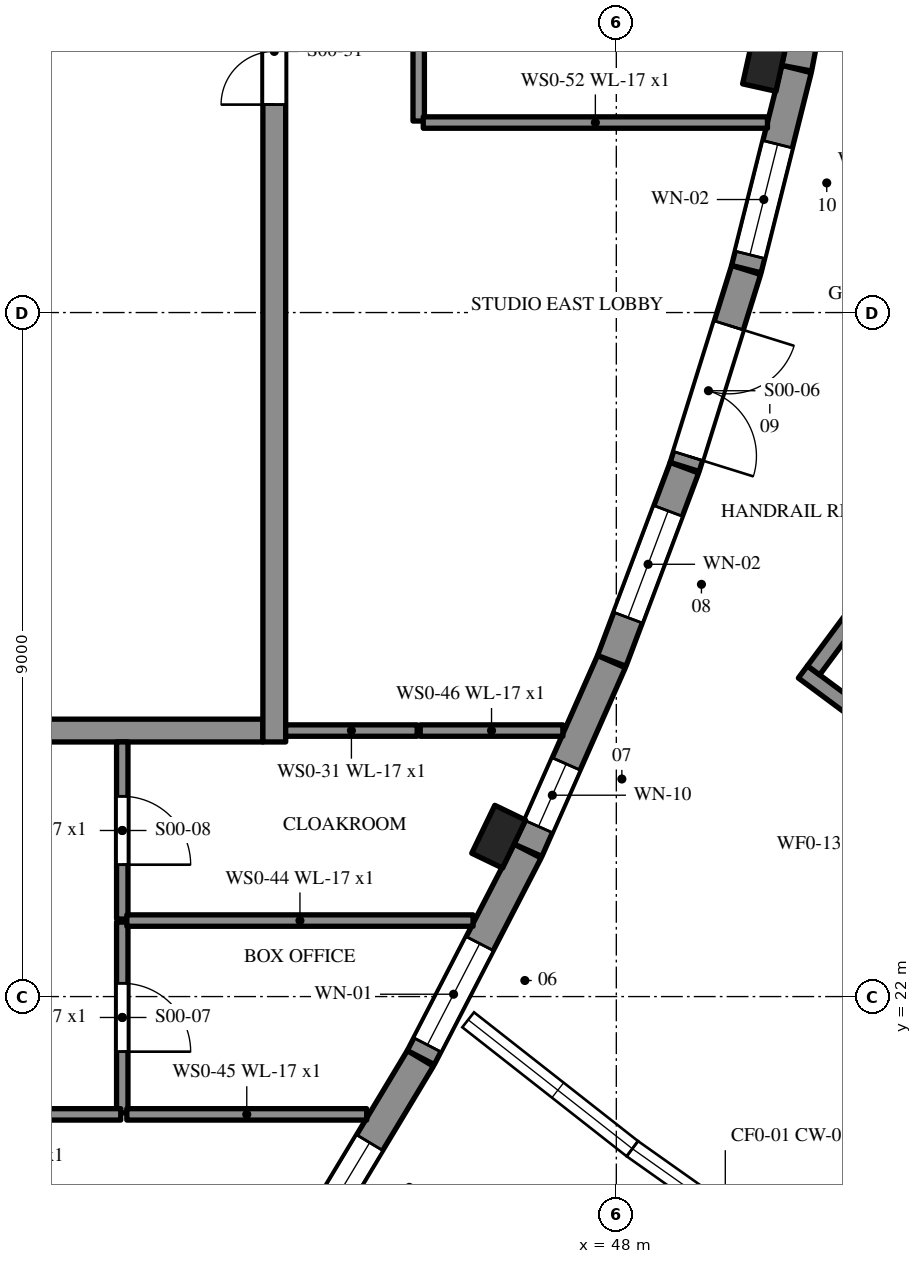
"""IFC4 building model, lengths in metres.
Left out: names, types, materials, properties, quantities, classifications, styles, units other than length and angle.
Written with IfcOpenShell. Run it as: python <this file> out.ifc"""

import sys

from ifc_helpers import new_model, si_unit, direction, frame, frame_2d, origin, origin_2d, place, context, subcontext, project, spatial, rectangle, extrude, element, fill, save


model = new_model("IFC4")
c1 = context("Model", 3, precision=1e-05, world=origin(), true_north=direction((0.0, 1.0)))
c2 = subcontext(c1, "Body", "Model", "MODEL_VIEW")
j1 = project(units=[si_unit("LENGTHUNIT", "METRE"), si_unit("PLANEANGLEUNIT", "RADIAN")], contexts=[c1])
p1 = place(None, origin())
s1 = spatial("IfcSite", under=j1, at=p1, CompositionType="ELEMENT")
p2 = place(p1, origin())
s2 = spatial("IfcBuilding", under=s1, at=p2, CompositionType="ELEMENT")
p3 = place(p2, origin())
s3 = spatial("IfcBuildingStorey", under=s2, at=p3, CompositionType="ELEMENT", Elevation=0.0)
p4 = place(p3, frame((43.846, 18.566, 0.0), z_axis=(0.0, 0.0, 1.0), x_axis=(0.515387841983, 0.856957042293, 0.0)))
e1 = element("IfcWall", 1, at=p4, inside=s3, PredefinedType="SOLIDWALL", context=c2, shape_type="SweptSolid", body=[
    extrude(rectangle(XDim=3.058, YDim=0.4, at=frame_2d((1.529, 0.0))), origin(), (0.0, 0.0, 1.0), 5.1),
])
p5 = place(p4, frame((0.264, 0.0, 2.4)))
e2 = element("IfcOpeningElement", 2, at=p5, cuts=e1, PredefinedType="OPENING", context=c2, shape_type="SweptSolid", body=[
    extrude(rectangle(XDim=1.5, YDim=0.9, at=frame_2d((0.75, 0.45))), frame((0.0, 0.21, 0.0), z_axis=(0.0, -1.0, 0.0), x_axis=(1.0, 0.0, 0.0)), (0.0, 0.0, 1.0), 0.42),
])
p6 = place(p3, frame((45.428, 21.198, 0.0), z_axis=(0.0, 0.0, 1.0), x_axis=(0.45930565039, 0.888278289457, 0.0)))
e3 = element("IfcWall", 3, at=p6, inside=s3, PredefinedType="SOLIDWALL", context=c2, shape_type="SweptSolid", body=[
    extrude(rectangle(XDim=3.059, YDim=0.4, at=frame_2d((1.529, 0.0))), origin(), (0.0, 0.0, 1.0), 5.1),
])
p7 = place(p6, frame((0.188, 0.0, 0.9)))
e4 = element("IfcOpeningElement", 4, at=p7, cuts=e3, PredefinedType="OPENING", context=c2, shape_type="SweptSolid", body=[
    extrude(rectangle(XDim=1.5, YDim=2.1, at=frame_2d((0.75, 1.05))), frame((0.0, 0.21, 0.0), z_axis=(0.0, -1.0, 0.0), x_axis=(1.0, 0.0, 0.0)), (0.0, 0.0, 1.0), 0.42),
])
p8 = place(p3, frame((46.838, 23.925, 0.0), z_axis=(0.0, 0.0, 1.0), x_axis=(0.404652153757, 0.914470685402, 0.0)))
e5 = element("IfcWall", 5, at=p8, inside=s3, PredefinedType="SOLIDWALL", context=c2, shape_type="SweptSolid", body=[
    extrude(rectangle(XDim=2.714, YDim=0.4, at=frame_2d((1.357, 0.0))), origin(), (0.0, 0.0, 1.0), 5.1),
])
p9 = place(p8, frame((0.342, 0.0, 0.9)))
e6 = element("IfcOpeningElement", 6, at=p9, cuts=e5, PredefinedType="OPENING", context=c2, shape_type="SweptSolid", body=[
    extrude(rectangle(XDim=0.9, YDim=2.1, at=frame_2d((0.45, 1.05))), frame((0.0, 0.21, 0.0), z_axis=(0.0, -1.0, 0.0), x_axis=(1.0, 0.0, 0.0)), (0.0, 0.0, 1.0), 0.42),
])
p10 = place(p3, frame((47.94, 26.417, 0.0), z_axis=(0.0, 0.0, 1.0), x_axis=(0.351862601417, 0.936051659752, 0.0)))
e7 = element("IfcWall", 7, at=p10, inside=s3, PredefinedType="SOLIDWALL", context=c2, shape_type="SweptSolid", body=[
    extrude(rectangle(XDim=2.714, YDim=0.4, at=frame_2d((1.357, 0.0))), origin(), (0.0, 0.0, 1.0), 5.1),
])
p11 = place(p10, frame((0.607, 0.0, 0.3)))
e8 = element("IfcOpeningElement", 8, at=p11, cuts=e7, PredefinedType="OPENING", context=c2, shape_type="SweptSolid", body=[
    extrude(rectangle(XDim=1.5, YDim=2.7, at=frame_2d((0.75, 1.35))), frame((0.0, 0.21, 0.0), z_axis=(0.0, -1.0, 0.0), x_axis=(1.0, 0.0, 0.0)), (0.0, 0.0, 1.0), 0.42),
])
p12 = place(p3, frame((48.899, 28.969, 0.0), z_axis=(0.0, 0.0, 1.0), x_axis=(0.29795748067, 0.954579142718, 0.0)))
e9 = element("IfcWall", 9, at=p12, inside=s3, PredefinedType="SOLIDWALL", context=c2, shape_type="SweptSolid", body=[
    extrude(rectangle(XDim=2.715, YDim=0.4, at=frame_2d((1.357, 0.0))), origin(), (0.0, 0.0, 1.0), 5.1),
])
p13 = place(p12, frame((0.15, 0.0, 0.0)))
e10 = element("IfcOpeningElement", 10, at=p13, cuts=e9, PredefinedType="OPENING", context=c2, shape_type="SweptSolid", body=[
    extrude(rectangle(XDim=1.8, YDim=2.1, at=frame_2d((0.9, 1.05))), frame((0.0, 0.21, 0.0), z_axis=(0.0, -1.0, 0.0), x_axis=(1.0, 0.0, 0.0)), (0.0, 0.0, 1.0), 0.42),
])
p14 = place(p3, frame((49.711, 31.571, 0.0), z_axis=(0.0, 0.0, 1.0), x_axis=(0.2430011368, 0.970026003525, 0.0)))
e11 = element("IfcWall", 11, at=p14, inside=s3, PredefinedType="SOLIDWALL", context=c2, shape_type="SweptSolid", body=[
    extrude(rectangle(XDim=2.715, YDim=0.4, at=frame_2d((1.357, 0.0))), origin(), (0.0, 0.0, 1.0), 5.1),
])
p15 = place(p14, frame((0.194, 0.0, 0.3)))
e12 = element("IfcOpeningElement", 12, at=p15, cuts=e11, PredefinedType="OPENING", context=c2, shape_type="SweptSolid", body=[
    extrude(rectangle(XDim=1.5, YDim=2.7, at=frame_2d((0.75, 1.35))), frame((0.0, 0.21, 0.0), z_axis=(0.0, -1.0, 0.0), x_axis=(1.0, 0.0, 0.0)), (0.0, 0.0, 1.0), 0.42),
])
p16 = place(p3, frame((50.373, 34.215, 0.0), z_axis=(0.0, 0.0, 1.0), x_axis=(0.188763210152, 0.982022632373, 0.0)))
e13 = element("IfcWall", 13, at=p16, inside=s3, PredefinedType="SOLIDWALL", context=c2, shape_type="SweptSolid", body=[
    extrude(rectangle(XDim=2.582, YDim=0.4, at=frame_2d((1.291, 0.0))), origin(), (0.0, 0.0, 1.0), 5.1),
])
p17 = place(p16, frame((0.841, 0.0, 2.0)))
e14 = element("IfcOpeningElement", 14, at=p17, cuts=e13, PredefinedType="OPENING", context=c2, shape_type="SweptSolid", body=[
    extrude(rectangle(XDim=0.9, YDim=0.6, at=frame_2d((0.45, 0.3))), frame((0.0, 0.21, 0.0), z_axis=(0.0, -1.0, 0.0), x_axis=(1.0, 0.0, 0.0)), (0.0, 0.0, 1.0), 0.42),
])
for number, where, z_axis, x_axis in (
    (15, (46.452, 24.104, 0.0), (0.0, 0.0, 1.0), (0.434, 0.901, 0.0)),
    (16, (49.957, 34.302, 0.0), (0.0, 0.0, 1.0), (0.217, 0.976, 0.0)),
):
    element("IfcColumn", number, at=place(p3, frame(where, z_axis=z_axis, x_axis=x_axis)), inside=s3, PredefinedType="PILASTER", context=c2, shape_type="SweptSolid", body=[
        extrude(rectangle(XDim=0.7, YDim=0.45, at=origin_2d()), origin(), (0.0, 0.0, 1.0), 5.1),
    ])
p18 = place(p3, frame((43.35, 25.5, 0.0), z_axis=(0.0, 0.0, 1.0), x_axis=(-1.0, 0.0, 0.0)))
e17 = element("IfcWall", 17, at=p18, inside=s3, PredefinedType="SHEAR", context=c2, shape_type="SweptSolid", body=[
    extrude(rectangle(XDim=14.7, YDim=0.3, at=frame_2d((7.35, 0.0))), origin(), (0.0, 0.0, 1.0), 5.1),
])
p19 = place(p18, frame((6.45, 0.0, 0.0)))
e18 = element("IfcOpeningElement", 18, at=p19, cuts=e17, PredefinedType="OPENING", context=c2, shape_type="SweptSolid", body=[
    extrude(rectangle(XDim=1.8, YDim=2.1, at=frame_2d((0.9, 1.05))), frame((0.0, 0.16, 0.0), z_axis=(0.0, -1.0, 0.0), x_axis=(1.0, 0.0, 0.0)), (0.0, 0.0, 1.0), 0.32),
])
p20 = place(p3, frame((43.5, 25.35, 0.0), z_axis=(0.0, 0.0, 1.0), x_axis=(0.0, 1.0, 0.0)))
e19 = element("IfcWall", 19, at=p20, inside=s3, PredefinedType="SHEAR", context=c2, shape_type="SweptSolid", body=[
    extrude(rectangle(XDim=41.3, YDim=0.3, at=frame_2d((20.65, 0.0))), origin(), (0.0, 0.0, 1.0), 5.1),
])
p21 = place(p20, frame((8.386, 0.0, 0.0)))
e20 = element("IfcOpeningElement", 20, at=p21, cuts=e19, PredefinedType="OPENING", context=c2, shape_type="SweptSolid", body=[
    extrude(rectangle(XDim=1.4, YDim=2.1, at=frame_2d((0.7, 1.05))), frame((0.0, 0.16, 0.0), z_axis=(0.0, -1.0, 0.0), x_axis=(1.0, 0.0, 0.0)), (0.0, 0.0, 1.0), 0.32),
])
p22 = place(p20, frame((31.514, 0.0, 0.0)))
e21 = element("IfcOpeningElement", 21, at=p22, cuts=e19, PredefinedType="OPENING", context=c2, shape_type="SweptSolid", body=[
    extrude(rectangle(XDim=1.4, YDim=2.1, at=frame_2d((0.7, 1.05))), frame((0.0, 0.16, 0.0), z_axis=(0.0, -1.0, 0.0), x_axis=(1.0, 0.0, 0.0)), (0.0, 0.0, 1.0), 0.32),
])
p23 = place(p3, frame((52.79, 34.037, 0.0), z_axis=(0.0, 0.0, 1.0), x_axis=(-0.714838276245, 0.699289810318, 0.0)))
e22 = element("IfcWall", 22, at=p23, inside=s3, PredefinedType="SHEAR", context=c2, shape_type="SweptSolid", body=[
    extrude(rectangle(XDim=2.497, YDim=0.25, at=frame_2d((1.248, 0.0))), origin(), (0.0, 0.0, 1.0), 5.4),
])
p24 = place(p23, frame((0.748, 0.0, 0.0)))
e23 = element("IfcOpeningElement", 23, at=p24, cuts=e22, PredefinedType="OPENING", context=c2, shape_type="SweptSolid", body=[
    extrude(rectangle(XDim=1.0, YDim=2.1, at=frame_2d((0.5, 1.05))), frame((0.0, 0.135, 0.0), z_axis=(0.0, -1.0, 0.0), x_axis=(1.0, 0.0, 0.0)), (0.0, 0.0, 1.0), 0.27),
])
p25 = place(p3, frame((45.38, 25.5, 0.0), z_axis=(0.0, 0.0, 1.0), x_axis=(-1.0, 0.0, 0.0)))
e24 = element("IfcWall", 24, at=p25, inside=s3, PredefinedType="PARTITIONING", context=c2, shape_type="SweptSolid", body=[
    extrude(rectangle(XDim=1.73, YDim=0.15, at=frame_2d((0.865, 0.0))), origin(), (0.0, 0.0, 1.0), 5.1),
])
p26 = place(p3, frame((45.4, 38.98, 0.0), z_axis=(0.0, 0.0, 1.0), x_axis=(0.0, -1.0, 0.0)))
e25 = element("IfcWall", 25, at=p26, inside=s3, PredefinedType="PARTITIONING", context=c2, shape_type="SweptSolid", body=[
    extrude(rectangle(XDim=5.46, YDim=0.15, at=frame_2d((2.73, 0.0))), origin(), (0.0, 0.0, 1.0), 5.1),
])
p27 = place(p26, frame((2.28, 0.0, 0.0)))
e26 = element("IfcOpeningElement", 26, at=p27, cuts=e25, PredefinedType="OPENING", context=c2, shape_type="SweptSolid", body=[
    extrude(rectangle(XDim=0.9, YDim=2.1, at=frame_2d((0.45, 1.05))), frame((0.0, 0.085, 0.0), z_axis=(0.0, -1.0, 0.0), x_axis=(1.0, 0.0, 0.0)), (0.0, 0.0, 1.0), 0.17),
])
p28 = place(p3, frame((41.5, 22.98, 0.0), z_axis=(0.0, 0.0, 1.0), x_axis=(0.0, -1.0, 0.0)))
e27 = element("IfcWall", 27, at=p28, inside=s3, PredefinedType="PARTITIONING", context=c2, shape_type="SweptSolid", body=[
    extrude(rectangle(XDim=2.51, YDim=0.15, at=frame_2d((1.255, 0.0))), origin(), (0.0, 0.0, 1.0), 5.1),
])
p29 = place(p28, frame((0.805, 0.0, 0.0)))
e28 = element("IfcOpeningElement", 28, at=p29, cuts=e27, PredefinedType="OPENING", context=c2, shape_type="SweptSolid", body=[
    extrude(rectangle(XDim=0.9, YDim=2.1, at=frame_2d((0.45, 1.05))), frame((0.0, 0.085, 0.0), z_axis=(0.0, -1.0, 0.0), x_axis=(1.0, 0.0, 0.0)), (0.0, 0.0, 1.0), 0.17),
])
p30 = place(p3, frame((41.5, 25.351, 0.0), z_axis=(0.0, 0.0, 1.0), x_axis=(0.0, -1.0, 0.0)))
e29 = element("IfcWall", 29, at=p30, inside=s3, PredefinedType="PARTITIONING", context=c2, shape_type="SweptSolid", body=[
    extrude(rectangle(XDim=2.331, YDim=0.15, at=frame_2d((1.165, 0.0))), origin(), (0.0, 0.0, 1.0), 5.1),
])
p31 = place(p30, frame((0.715, 0.0, 0.0)))
e30 = element("IfcOpeningElement", 30, at=p31, cuts=e29, PredefinedType="OPENING", context=c2, shape_type="SweptSolid", body=[
    extrude(rectangle(XDim=0.9, YDim=2.1, at=frame_2d((0.45, 1.05))), frame((0.0, 0.085, 0.0), z_axis=(0.0, -1.0, 0.0), x_axis=(1.0, 0.0, 0.0)), (0.0, 0.0, 1.0), 0.17),
])
p32 = place(p3, frame((41.48, 20.45, 0.0), z_axis=(0.0, 0.0, 1.0), x_axis=(-1.0, 0.0, 0.0)))
e31 = element("IfcWall", 31, at=p32, inside=s3, PredefinedType="PARTITIONING", context=c2, shape_type="SweptSolid", body=[
    extrude(rectangle(XDim=3.46, YDim=0.15, at=frame_2d((1.73, 0.0))), origin(), (0.0, 0.0, 1.0), 5.1),
])
p33 = place(p32, frame((1.28, 0.0, 0.0)))
e32 = element("IfcOpeningElement", 32, at=p33, cuts=e31, PredefinedType="OPENING", context=c2, shape_type="SweptSolid", body=[
    extrude(rectangle(XDim=0.9, YDim=2.1, at=frame_2d((0.45, 1.05))), frame((0.0, 0.085, 0.0), z_axis=(0.0, -1.0, 0.0), x_axis=(1.0, 0.0, 0.0)), (0.0, 0.0, 1.0), 0.17),
])
p34 = place(p3, frame((41.56, 23.0, 0.0), z_axis=(0.0, 0.0, 1.0), x_axis=(1.0, 0.0, 0.0)))
e33 = element("IfcWall", 33, at=p34, inside=s3, PredefinedType="PARTITIONING", context=c2, shape_type="SweptSolid", body=[
    extrude(rectangle(XDim=4.555, YDim=0.15, at=frame_2d((2.278, 0.0))), origin(), (0.0, 0.0, 1.0), 5.1),
])
p35 = place(p3, frame((44.716, 20.45, 0.0), z_axis=(0.0, 0.0, 1.0), x_axis=(-1.0, 0.0, 0.0)))
e34 = element("IfcWall", 34, at=p35, inside=s3, PredefinedType="PARTITIONING", context=c2, shape_type="SweptSolid", body=[
    extrude(rectangle(XDim=3.156, YDim=0.15, at=frame_2d((1.578, 0.0))), origin(), (0.0, 0.0, 1.0), 5.1),
])
p36 = place(p3, frame((45.42, 25.5, 0.0), z_axis=(0.0, 0.0, 1.0), x_axis=(1.0, 0.0, 0.0)))
e35 = element("IfcWall", 35, at=p36, inside=s3, PredefinedType="PARTITIONING", context=c2, shape_type="SweptSolid", body=[
    extrude(rectangle(XDim=1.877, YDim=0.15, at=frame_2d((0.938, 0.0))), origin(), (0.0, 0.0, 1.0), 5.1),
])
p37 = place(p3, frame((45.46, 33.5, 0.0), z_axis=(0.0, 0.0, 1.0), x_axis=(1.0, 0.0, 0.0)))
e36 = element("IfcWall", 36, at=p37, inside=s3, PredefinedType="PARTITIONING", context=c2, shape_type="SweptSolid", body=[
    extrude(rectangle(XDim=4.529, YDim=0.15, at=frame_2d((2.264, 0.0))), origin(), (0.0, 0.0, 1.0), 5.1),
])
p38 = place(p3, frame((53.787, 23.799, 0.0), z_axis=(0.0, 0.0, 1.0), x_axis=(-0.803074417046, 0.595878746631, 0.0)))
e37 = element("IfcWall", 37, at=p38, inside=s3, PredefinedType="SHEAR", context=c2, shape_type="SweptSolid", body=[
    extrude(rectangle(XDim=4.15, YDim=0.2, at=frame_2d((2.075, 0.0))), origin(), (0.0, 0.0, 1.0), 5.4),
])
p39 = place(p38, frame((1.525, 0.0, 0.0)))
e38 = element("IfcOpeningElement", 38, at=p39, cuts=e37, PredefinedType="OPENING", context=c2, shape_type="SweptSolid", body=[
    extrude(rectangle(XDim=1.1, YDim=2.1, at=frame_2d((0.55, 1.05))), frame((0.0, 0.11, 0.0), z_axis=(0.0, -1.0, 0.0), x_axis=(1.0, 0.0, 0.0)), (0.0, 0.0, 1.0), 0.22),
])
p40 = place(p3, frame((50.594, 26.292, 0.0), z_axis=(0.0, 0.0, 1.0), x_axis=(0.595865972218, 0.803083895463, 0.0)))
e39 = element("IfcWall", 39, at=p40, inside=s3, PredefinedType="SHEAR", context=c2, shape_type="SweptSolid", body=[
    extrude(rectangle(XDim=8.0, YDim=0.2, at=frame_2d((4.0, 0.0))), origin(), (0.0, 0.0, 1.0), 5.4),
])
p41 = place(p13, frame((1.8, 0.0, 0.0), z_axis=(0.0, 0.0, 1.0), x_axis=(-1.0, 0.0, 0.0)))
e40 = element("IfcDoor", 40, at=p41, inside=s3, OperationType="DOUBLE_DOOR_SINGLE_SWING", PredefinedType="DOOR", context=c2, shape_type="SweptSolid", body=[
    extrude(rectangle(XDim=1.8, YDim=2.1, at=frame_2d((0.9, 1.05))), frame((0.0, 0.025, 0.0), z_axis=(0.0, -1.0, 0.0), x_axis=(1.0, 0.0, 0.0)), (0.0, 0.0, 1.0), 0.05),
])
fill(e10, e40)
p42 = place(p5, origin())
e41 = element("IfcWindow", 41, at=p42, inside=s3, PartitioningType="SINGLE_PANEL", PredefinedType="WINDOW", context=c2, shape_type="SweptSolid", body=[
    extrude(rectangle(XDim=1.5, YDim=0.9, at=frame_2d((0.75, 0.45))), frame((0.0, 0.03, 0.0), z_axis=(0.0, -1.0, 0.0), x_axis=(1.0, 0.0, 0.0)), (0.0, 0.0, 1.0), 0.06),
])
fill(e2, e41)
p43 = place(p7, origin())
e42 = element("IfcWindow", 42, at=p43, inside=s3, PartitioningType="SINGLE_PANEL", PredefinedType="WINDOW", context=c2, shape_type="SweptSolid", body=[
    extrude(rectangle(XDim=1.5, YDim=2.1, at=frame_2d((0.75, 1.05))), frame((0.0, 0.03, 0.0), z_axis=(0.0, -1.0, 0.0), x_axis=(1.0, 0.0, 0.0)), (0.0, 0.0, 1.0), 0.06),
])
fill(e4, e42)
p44 = place(p9, origin())
e43 = element("IfcWindow", 43, at=p44, inside=s3, PartitioningType="SINGLE_PANEL", PredefinedType="WINDOW", context=c2, shape_type="SweptSolid", body=[
    extrude(rectangle(XDim=0.9, YDim=2.1, at=frame_2d((0.45, 1.05))), frame((0.0, 0.03, 0.0), z_axis=(0.0, -1.0, 0.0), x_axis=(1.0, 0.0, 0.0)), (0.0, 0.0, 1.0), 0.06),
])
fill(e6, e43)
p45 = place(p11, origin())
e44 = element("IfcWindow", 44, at=p45, inside=s3, PartitioningType="SINGLE_PANEL", PredefinedType="WINDOW", context=c2, shape_type="SweptSolid", body=[
    extrude(rectangle(XDim=1.5, YDim=2.7, at=frame_2d((0.75, 1.35))), frame((0.0, 0.03, 0.0), z_axis=(0.0, -1.0, 0.0), x_axis=(1.0, 0.0, 0.0)), (0.0, 0.0, 1.0), 0.06),
])
fill(e8, e44)
p46 = place(p15, origin())
e45 = element("IfcWindow", 45, at=p46, inside=s3, PartitioningType="SINGLE_PANEL", PredefinedType="WINDOW", context=c2, shape_type="SweptSolid", body=[
    extrude(rectangle(XDim=1.5, YDim=2.7, at=frame_2d((0.75, 1.35))), frame((0.0, 0.03, 0.0), z_axis=(0.0, -1.0, 0.0), x_axis=(1.0, 0.0, 0.0)), (0.0, 0.0, 1.0), 0.06),
])
fill(e12, e45)
p47 = place(p29, origin())
e46 = element("IfcDoor", 46, at=p47, inside=s3, OperationType="SINGLE_SWING_RIGHT", PredefinedType="DOOR", context=c2, shape_type="SweptSolid", body=[
    extrude(rectangle(XDim=0.9, YDim=2.1, at=frame_2d((0.45, 1.05))), frame((0.0, 0.025, 0.0), z_axis=(0.0, -1.0, 0.0), x_axis=(1.0, 0.0, 0.0)), (0.0, 0.0, 1.0), 0.05),
])
fill(e28, e46)
p48 = place(p31, origin())
e47 = element("IfcDoor", 47, at=p48, inside=s3, OperationType="SINGLE_SWING_RIGHT", PredefinedType="DOOR", context=c2, shape_type="SweptSolid", body=[
    extrude(rectangle(XDim=0.9, YDim=2.1, at=frame_2d((0.45, 1.05))), frame((0.0, 0.025, 0.0), z_axis=(0.0, -1.0, 0.0), x_axis=(1.0, 0.0, 0.0)), (0.0, 0.0, 1.0), 0.05),
])
fill(e30, e47)
p49 = place(p21, origin())
e48 = element("IfcDoor", 48, at=p49, inside=s3, OperationType="DOUBLE_DOOR_SINGLE_SWING", PredefinedType="DOOR", context=c2, shape_type="SweptSolid", body=[
    extrude(rectangle(XDim=1.4, YDim=2.1, at=frame_2d((0.7, 1.05))), frame((0.0, 0.025, 0.0), z_axis=(0.0, -1.0, 0.0), x_axis=(1.0, 0.0, 0.0)), (0.0, 0.0, 1.0), 0.05),
])
fill(e20, e48)
save(model, sys.argv[1])
